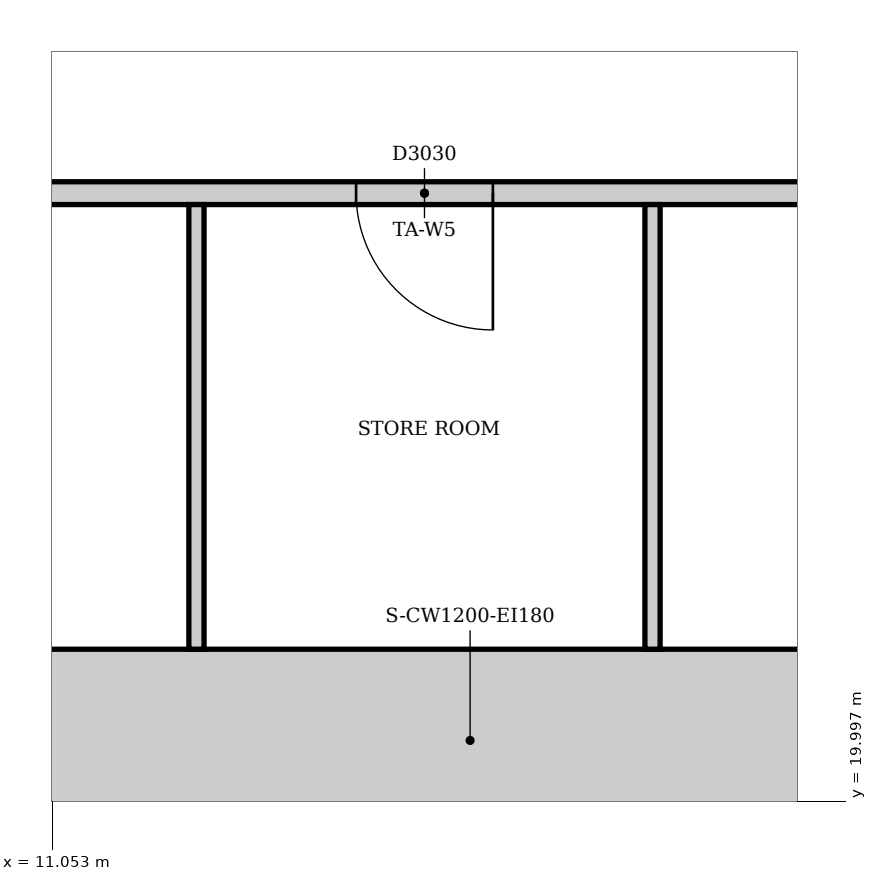
"""IFC4 building model, lengths in metres.
Left out: names, types, materials, properties, quantities, classifications, styles, units other than length and angle.
Written with IfcOpenShell. Run it as: python <this file> out.ifc"""

import sys

from ifc_helpers import new_model, si_unit, direction, frame, frame_2d, origin, place, context, subcontext, project, spatial, rectangle, extrude, element, fill, save


model = new_model("IFC4")
c1 = context("Model", 3, precision=1e-05, world=origin(), true_north=direction((0.0, 1.0)))
c2 = subcontext(c1, "Body", "Model", "MODEL_VIEW")
j1 = project(units=[si_unit("LENGTHUNIT", "METRE"), si_unit("PLANEANGLEUNIT", "RADIAN")], contexts=[c1])
p1 = place(None, origin())
s1 = spatial("IfcSite", under=j1, at=p1, CompositionType="ELEMENT")
p2 = place(p1, origin())
s2 = spatial("IfcBuilding", under=s1, at=p2, CompositionType="ELEMENT")
p3 = place(p2, frame((0.0, 0.0, -9.5)))
s3 = spatial("IfcBuildingStorey", under=s2, at=p3, CompositionType="ELEMENT", Elevation=-9.5)
p4 = place(p3, frame((3.9, 20.4, 0.0), z_axis=(0.0, 0.0, 1.0), x_axis=(1.0, 0.0, 0.0)))
e1 = element("IfcWall", 1, at=p4, inside=s3, PredefinedType="SOLIDWALL", context=c2, shape_type="SweptSolid", body=[
    extrude(rectangle(XDim=19.8, YDim=1.2, at=frame_2d((9.9, 0.0))), origin(), (0.0, 0.0, 1.0), 4.5),
])
p5 = place(p3, frame((4.5, 24.0, 0.0), z_axis=(0.0, 0.0, 1.0), x_axis=(1.0, 0.0, 0.0)))
e2 = element("IfcWall", 2, at=p5, inside=s3, PredefinedType="PARTITIONING", context=c2, shape_type="SweptSolid", body=[
    extrude(rectangle(XDim=18.0, YDim=0.15, at=frame_2d((9.0, 0.0))), origin(), (0.0, 0.0, 1.0), 4.15),
])
p6 = place(p5, frame((3.35, 0.0, 0.0)))
e3 = element("IfcOpeningElement", 3, at=p6, cuts=e2, PredefinedType="OPENING", context=c2, shape_type="SweptSolid", body=[
    extrude(rectangle(XDim=0.9, YDim=2.1, at=frame_2d((0.45, 1.05))), frame((0.0, 0.085, 0.0), z_axis=(0.0, -1.0, 0.0), x_axis=(1.0, 0.0, 0.0)), (0.0, 0.0, 1.0), 0.17),
])
p7 = place(p5, frame((8.55, 0.0, 0.0)))
e4 = element("IfcOpeningElement", 4, at=p7, cuts=e2, PredefinedType="OPENING", context=c2, shape_type="SweptSolid", body=[
    extrude(rectangle(XDim=0.9, YDim=2.1, at=frame_2d((0.45, 1.05))), frame((0.0, 0.085, 0.0), z_axis=(0.0, -1.0, 0.0), x_axis=(1.0, 0.0, 0.0)), (0.0, 0.0, 1.0), 0.17),
])
p8 = place(p5, frame((13.7, 0.0, 0.0)))
e5 = element("IfcOpeningElement", 5, at=p8, cuts=e2, PredefinedType="OPENING", context=c2, shape_type="SweptSolid", body=[
    extrude(rectangle(XDim=0.9, YDim=2.1, at=frame_2d((0.45, 1.05))), frame((0.0, 0.085, 0.0), z_axis=(0.0, -1.0, 0.0), x_axis=(1.0, 0.0, 0.0)), (0.0, 0.0, 1.0), 0.17),
])
for number, where, z_axis, x_axis in (
    (6, (12.0, 21.0, 0.0), (0.0, 0.0, 1.0), (0.0, 1.0, 0.0)),
    (7, (15.0, 21.0, 0.0), (0.0, 0.0, 1.0), (0.0, 1.0, 0.0)),
):
    element("IfcWall", number, at=place(p3, frame(where, z_axis=z_axis, x_axis=x_axis)), inside=s3, PredefinedType="PARTITIONING", context=c2, shape_type="SweptSolid", body=[
        extrude(rectangle(XDim=2.925, YDim=0.1, at=frame_2d((1.462, 0.0))), origin(), (0.0, 0.0, 1.0), 4.15),
    ])
p9 = place(p7, frame((0.9, 0.0, 0.0), z_axis=(0.0, 0.0, 1.0), x_axis=(-1.0, 0.0, 0.0)))
e8 = element("IfcDoor", 8, at=p9, inside=s3, OperationType="SINGLE_SWING_LEFT", PredefinedType="DOOR", context=c2, shape_type="SweptSolid", body=[
    extrude(rectangle(XDim=0.9, YDim=2.1, at=frame_2d((0.45, 1.05))), frame((0.0, 0.025, 0.0), z_axis=(0.0, -1.0, 0.0), x_axis=(1.0, 0.0, 0.0)), (0.0, 0.0, 1.0), 0.05),
])
fill(e4, e8)
save(model, sys.argv[1])
